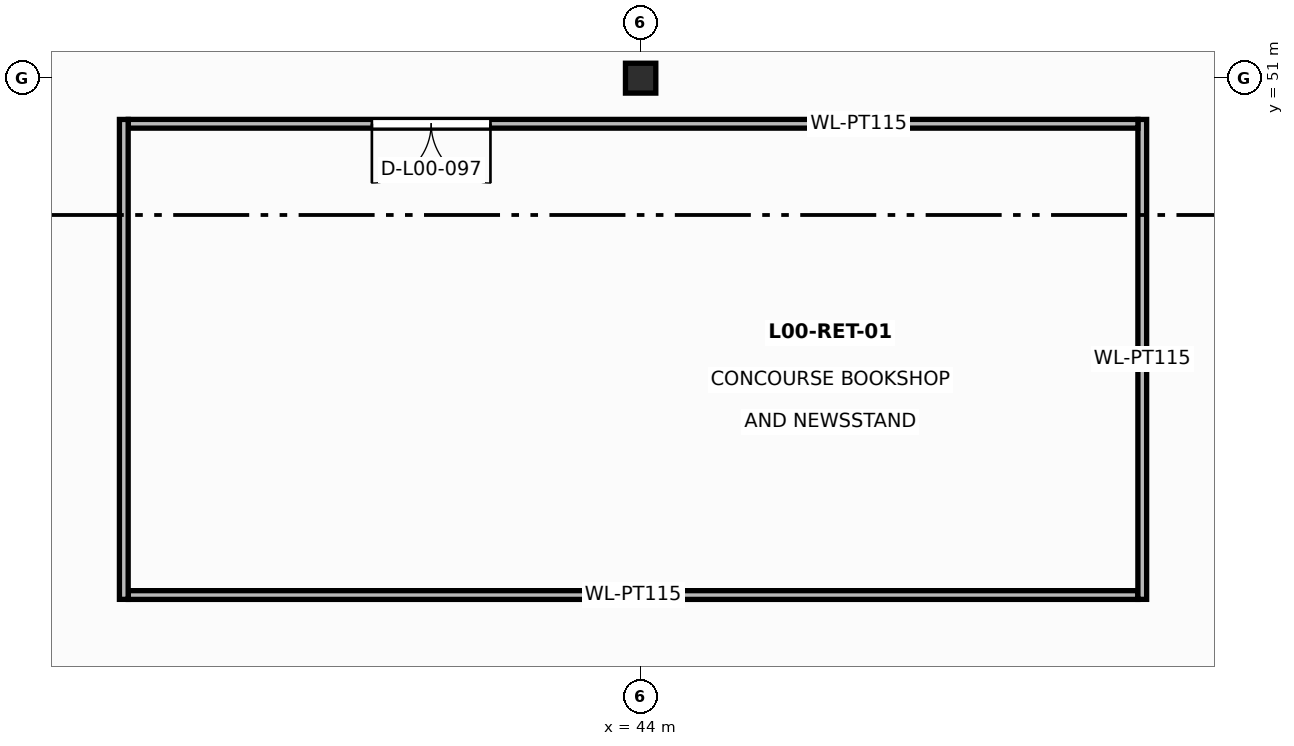
"""IFC4 building model, lengths in metres.
Left out: names, types, materials, properties, quantities, classifications, styles, units other than length and angle.
Written with IfcOpenShell. Run it as: python <this file> out.ifc"""

import sys

from ifc_helpers import new_model, si_unit, direction, frame, frame_2d, origin, origin_2d, place, context, subcontext, project, spatial, rectangle, i_section, extrude, element, fill, save


model = new_model("IFC4")
c1 = context("Model", 3, precision=1e-05, world=origin(), true_north=direction((0.0, 1.0)))
c2 = subcontext(c1, "Body", "Model", "MODEL_VIEW")
j1 = project(units=[si_unit("LENGTHUNIT", "METRE"), si_unit("PLANEANGLEUNIT", "RADIAN")], contexts=[c1])
p1 = place(None, origin())
s1 = spatial("IfcSite", under=j1, at=p1, CompositionType="ELEMENT")
p2 = place(p1, origin())
s2 = spatial("IfcBuilding", under=s1, at=p2, CompositionType="ELEMENT")
p3 = place(p2, origin())
s3 = spatial("IfcBuildingStorey", under=s2, at=p3, CompositionType="ELEMENT", Elevation=0.0)
p4 = place(p3, frame((44.0, 51.0, 0.0), z_axis=(0.0, 0.0, 1.0), x_axis=(1.0, 0.0, 0.0)))
e1 = element("IfcColumn", 1, at=p4, inside=s3, PredefinedType="COLUMN", context=c2, shape_type="SweptSolid", body=[
    extrude(i_section(OverallWidth=0.399, OverallDepth=0.393, WebThickness=0.023, FlangeThickness=0.037, at=origin_2d()), origin(), (0.0, 0.0, 1.0), 6.0),
])
p5 = place(p3, frame((37.258, 44.2, 0.0), z_axis=(0.0, 0.0, 1.0), x_axis=(1.0, 0.0, 0.0)))
e2 = element("IfcWall", 2, at=p5, inside=s3, PredefinedType="PARTITIONING", context=c2, shape_type="SweptSolid", body=[
    extrude(rectangle(XDim=13.285, YDim=0.115, at=frame_2d((6.643, 0.0))), origin(), (0.0, 0.0, 1.0), 5.73),
])
p6 = place(p3, frame((50.6, 44.143, 0.0), z_axis=(0.0, 0.0, 1.0), x_axis=(0.0, 1.0, 0.0)))
e3 = element("IfcWall", 3, at=p6, inside=s3, PredefinedType="PARTITIONING", context=c2, shape_type="SweptSolid", body=[
    extrude(rectangle(XDim=6.314, YDim=0.115, at=frame_2d((3.157, 0.0))), origin(), (0.0, 0.0, 1.0), 5.73),
])
p7 = place(p3, frame((50.543, 50.4, 0.0), z_axis=(0.0, 0.0, 1.0), x_axis=(-1.0, 0.0, 0.0)))
e4 = element("IfcWall", 4, at=p7, inside=s3, PredefinedType="PARTITIONING", context=c2, shape_type="SweptSolid", body=[
    extrude(rectangle(XDim=13.285, YDim=0.115, at=frame_2d((6.643, 0.0))), origin(), (0.0, 0.0, 1.0), 5.73),
])
p8 = place(p7, frame((8.519, 0.0, 0.0)))
e5 = element("IfcOpeningElement", 5, at=p8, cuts=e4, PredefinedType="OPENING", context=c2, shape_type="SweptSolid", body=[
    extrude(rectangle(XDim=1.56, YDim=2.22, at=frame_2d((0.78, 1.11))), frame((0.0, 0.067, 0.0), z_axis=(0.0, -1.0, 0.0), x_axis=(1.0, 0.0, 0.0)), (0.0, 0.0, 1.0), 0.135),
])
p9 = place(p3, frame((37.2, 50.457, 0.0), z_axis=(0.0, 0.0, 1.0), x_axis=(0.0, -1.0, 0.0)))
e6 = element("IfcWall", 6, at=p9, inside=s3, PredefinedType="PARTITIONING", context=c2, shape_type="SweptSolid", body=[
    extrude(rectangle(XDim=6.314, YDim=0.115, at=frame_2d((3.157, 0.0))), origin(), (0.0, 0.0, 1.0), 5.73),
])
p10 = place(p8, origin())
e7 = element("IfcDoor", 7, at=p10, inside=s3, OperationType="DOUBLE_DOOR_SINGLE_SWING", PredefinedType="DOOR", context=c2, shape_type="SweptSolid", body=[
    extrude(rectangle(XDim=1.56, YDim=2.22, at=frame_2d((0.78, 1.11))), frame((0.0, 0.025, 0.0), z_axis=(0.0, -1.0, 0.0), x_axis=(1.0, 0.0, 0.0)), (0.0, 0.0, 1.0), 0.05),
])
fill(e5, e7)
save(model, sys.argv[1])
